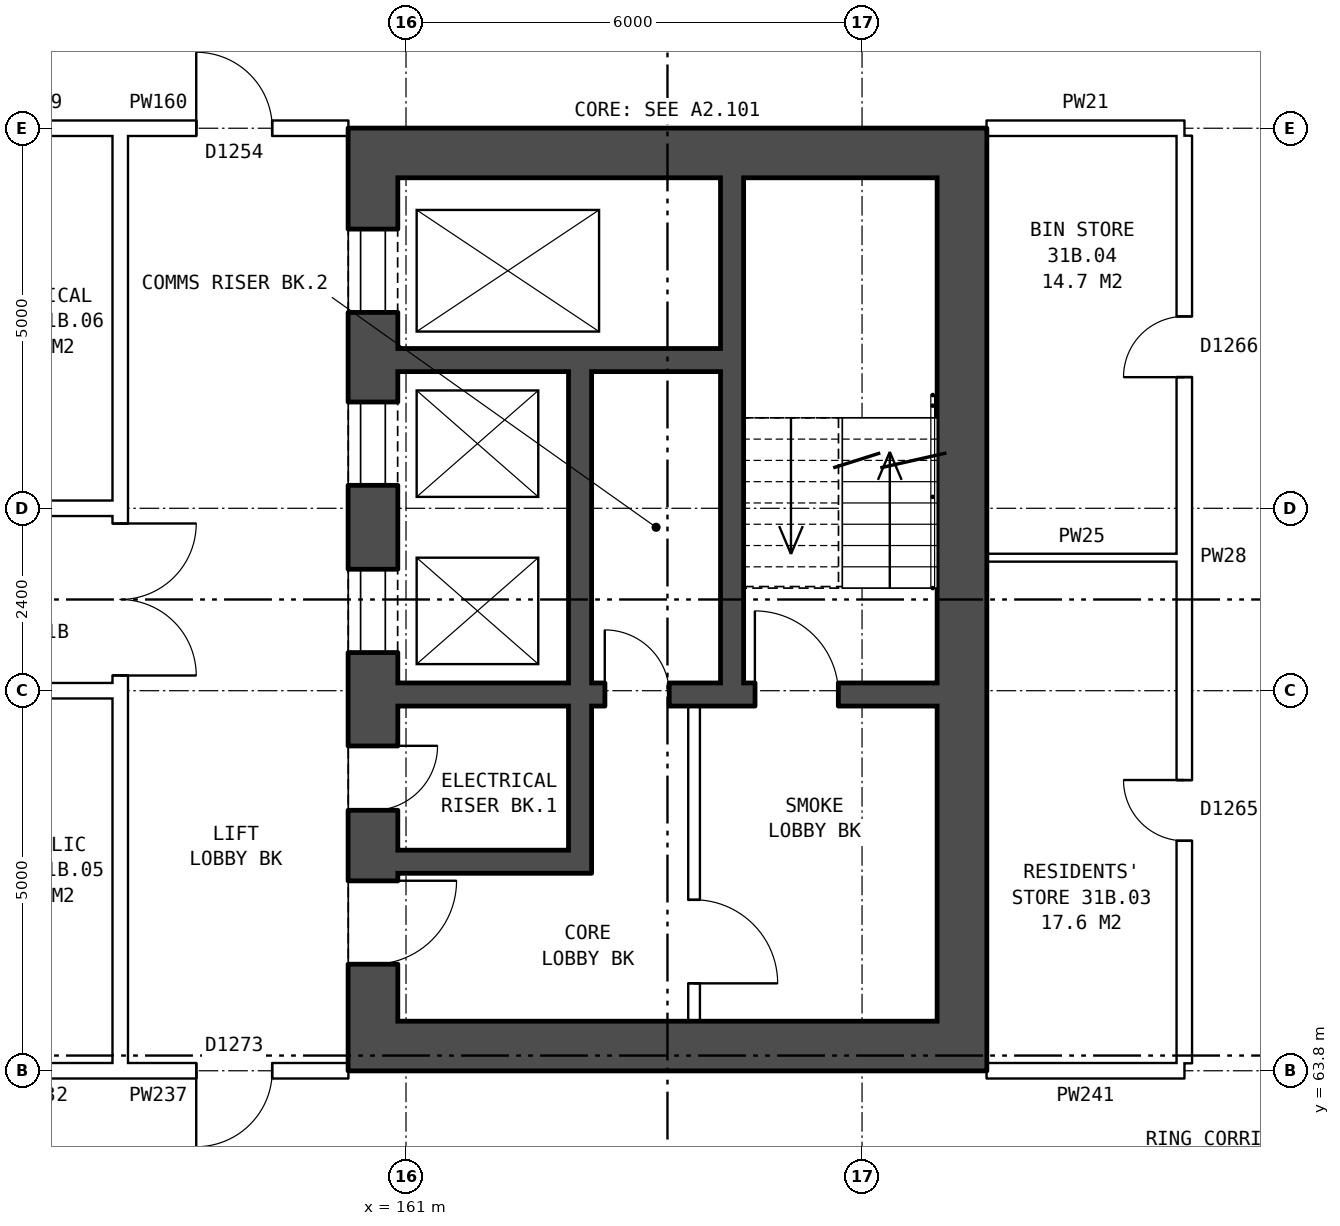
"""IFC4 building model, lengths in metres.
Left out: names, types, materials, properties, quantities, classifications, styles, units other than length and angle.
Written with IfcOpenShell. Run it as: python <this file> out.ifc"""

import sys

from ifc_helpers import new_model, si_unit, direction, frame, frame_2d, origin, place, context, subcontext, project, spatial, rectangle, extrude, element, fill, save


model = new_model("IFC4")
c1 = context("Model", 3, precision=1e-05, world=origin(), true_north=direction((0.0, 1.0)))
c2 = subcontext(c1, "Body", "Model", "MODEL_VIEW")
j1 = project(units=[si_unit("LENGTHUNIT", "METRE"), si_unit("PLANEANGLEUNIT", "RADIAN")], contexts=[c1])
p1 = place(None, origin())
s1 = spatial("IfcSite", under=j1, at=p1, CompositionType="ELEMENT")
p2 = place(p1, origin())
s2 = spatial("IfcBuilding", under=s1, at=p2, CompositionType="ELEMENT")
p3 = place(p2, frame((0.0, 0.0, 111.9)))
s3 = spatial("IfcBuildingStorey", under=s2, at=p3, CompositionType="ELEMENT", Elevation=111.9)
p4 = place(p3, frame((160.565, 75.55, 0.0), z_axis=(0.0, 0.0, 1.0), x_axis=(0.0, -1.0, 0.0)))
e1 = element("IfcWall", 1, at=p4, inside=s3, PredefinedType="SHEAR", context=c2, shape_type="SweptSolid", body=[
    extrude(rectangle(XDim=11.1, YDim=0.65, at=frame_2d((5.55, 0.0))), origin(), (0.0, 0.0, 1.0), 2.85),
])
p5 = place(p4, frame((0.675, 0.0, 0.0)))
e2 = element("IfcOpeningElement", 2, at=p5, cuts=e1, PredefinedType="OPENING", context=c2, shape_type="SweptSolid", body=[
    extrude(rectangle(XDim=1.1, YDim=2.1, at=frame_2d((0.55, 1.05))), frame((0.0, 0.335, 0.0), z_axis=(0.0, -1.0, 0.0), x_axis=(1.0, 0.0, 0.0)), (0.0, 0.0, 1.0), 0.67),
])
p6 = place(p4, frame((2.95, 0.0, 0.0)))
e3 = element("IfcOpeningElement", 3, at=p6, cuts=e1, PredefinedType="OPENING", context=c2, shape_type="SweptSolid", body=[
    extrude(rectangle(XDim=1.1, YDim=2.1, at=frame_2d((0.55, 1.05))), frame((0.0, 0.335, 0.0), z_axis=(0.0, -1.0, 0.0), x_axis=(1.0, 0.0, 0.0)), (0.0, 0.0, 1.0), 0.67),
])
p7 = place(p4, frame((5.15, 0.0, 0.0)))
e4 = element("IfcOpeningElement", 4, at=p7, cuts=e1, PredefinedType="OPENING", context=c2, shape_type="SweptSolid", body=[
    extrude(rectangle(XDim=1.1, YDim=2.1, at=frame_2d((0.55, 1.05))), frame((0.0, 0.335, 0.0), z_axis=(0.0, -1.0, 0.0), x_axis=(1.0, 0.0, 0.0)), (0.0, 0.0, 1.0), 0.67),
])
p8 = place(p4, frame((9.25, 0.0, 0.0)))
e5 = element("IfcOpeningElement", 5, at=p8, cuts=e1, PredefinedType="OPENING", context=c2, shape_type="SweptSolid", body=[
    extrude(rectangle(XDim=1.1, YDim=2.1, at=frame_2d((0.55, 1.05))), frame((0.0, 0.335, 0.0), z_axis=(0.0, -1.0, 0.0), x_axis=(1.0, 0.0, 0.0)), (0.0, 0.0, 1.0), 0.67),
])
p9 = place(p4, frame((7.475, 0.0, 0.0)))
e6 = element("IfcOpeningElement", 6, at=p9, cuts=e1, PredefinedType="OPENING", context=c2, shape_type="SweptSolid", body=[
    extrude(rectangle(XDim=0.85, YDim=2.1, at=frame_2d((0.425, 1.05))), frame((0.0, 0.335, 0.0), z_axis=(0.0, -1.0, 0.0), x_axis=(1.0, 0.0, 0.0)), (0.0, 0.0, 1.0), 0.67),
])
p10 = place(p3, frame((168.315, 75.55, 0.0), z_axis=(0.0, 0.0, 1.0), x_axis=(0.0, -1.0, 0.0)))
e7 = element("IfcWall", 7, at=p10, inside=s3, PredefinedType="SHEAR", context=c2, shape_type="SweptSolid", body=[
    extrude(rectangle(XDim=11.1, YDim=0.65, at=frame_2d((5.55, 0.0))), origin(), (0.0, 0.0, 1.0), 2.85),
])
for number, where, z_axis, x_axis in (
    (8, (160.24, 75.875, 0.0), (0.0, 0.0, 1.0), (1.0, 0.0, 0.0)),
    (9, (160.24, 64.125, 0.0), (0.0, 0.0, 1.0), (1.0, 0.0, 0.0)),
):
    element("IfcWall", number, at=place(p3, frame(where, z_axis=z_axis, x_axis=x_axis)), inside=s3, PredefinedType="SHEAR", context=c2, shape_type="SweptSolid", body=[
        extrude(rectangle(XDim=8.4, YDim=0.65, at=frame_2d((4.2, 0.0))), origin(), (0.0, 0.0, 1.0), 2.85),
    ])
p11 = place(p3, frame((160.89, 73.15, 0.0), z_axis=(0.0, 0.0, 1.0), x_axis=(1.0, 0.0, 0.0)))
e10 = element("IfcWall", 10, at=p11, inside=s3, PredefinedType="SHEAR", context=c2, shape_type="SweptSolid", body=[
    extrude(rectangle(XDim=4.25, YDim=0.3, at=frame_2d((2.125, 0.0))), origin(), (0.0, 0.0, 1.0), 2.85),
])
p12 = place(p3, frame((160.89, 68.75, 0.0), z_axis=(0.0, 0.0, 1.0), x_axis=(1.0, 0.0, 0.0)))
e11 = element("IfcWall", 11, at=p12, inside=s3, PredefinedType="SHEAR", context=c2, shape_type="SweptSolid", body=[
    extrude(rectangle(XDim=7.1, YDim=0.3, at=frame_2d((3.55, 0.0))), origin(), (0.0, 0.0, 1.0), 2.85),
])
p13 = place(p12, frame((4.7, 0.0, 0.0)))
e12 = element("IfcOpeningElement", 12, at=p13, cuts=e11, PredefinedType="OPENING", context=c2, shape_type="SweptSolid", body=[
    extrude(rectangle(XDim=1.1, YDim=2.1, at=frame_2d((0.55, 1.05))), frame((0.0, 0.16, 0.0), z_axis=(0.0, -1.0, 0.0), x_axis=(1.0, 0.0, 0.0)), (0.0, 0.0, 1.0), 0.32),
])
p14 = place(p12, frame((2.725, 0.0, 0.0)))
e13 = element("IfcOpeningElement", 13, at=p14, cuts=e11, PredefinedType="OPENING", context=c2, shape_type="SweptSolid", body=[
    extrude(rectangle(XDim=0.85, YDim=2.1, at=frame_2d((0.425, 1.05))), frame((0.0, 0.16, 0.0), z_axis=(0.0, -1.0, 0.0), x_axis=(1.0, 0.0, 0.0)), (0.0, 0.0, 1.0), 0.32),
])
p15 = place(p3, frame((160.89, 66.55, 0.0), z_axis=(0.0, 0.0, 1.0), x_axis=(1.0, 0.0, 0.0)))
e14 = element("IfcWall", 14, at=p15, inside=s3, PredefinedType="SHEAR", context=c2, shape_type="SweptSolid", body=[
    extrude(rectangle(XDim=2.25, YDim=0.3, at=frame_2d((1.125, 0.0))), origin(), (0.0, 0.0, 1.0), 2.85),
])
p16 = place(p3, frame((163.29, 73.0, 0.0), z_axis=(0.0, 0.0, 1.0), x_axis=(0.0, -1.0, 0.0)))
e15 = element("IfcWall", 15, at=p16, inside=s3, PredefinedType="SHEAR", context=c2, shape_type="SweptSolid", body=[
    extrude(rectangle(XDim=4.1, YDim=0.3, at=frame_2d((2.05, 0.0))), origin(), (0.0, 0.0, 1.0), 2.85),
])
p17 = place(p3, frame((163.29, 68.6, 0.0), z_axis=(0.0, 0.0, 1.0), x_axis=(0.0, -1.0, 0.0)))
e16 = element("IfcWall", 16, at=p17, inside=s3, PredefinedType="SHEAR", context=c2, shape_type="SweptSolid", body=[
    extrude(rectangle(XDim=2.2, YDim=0.3, at=frame_2d((1.1, 0.0))), origin(), (0.0, 0.0, 1.0), 2.85),
])
p18 = place(p3, frame((164.79, 68.6, 0.0), z_axis=(0.0, 0.0, 1.0), x_axis=(0.0, -1.0, 0.0)))
e17 = element("IfcWall", 17, at=p18, inside=s3, PredefinedType="PARTITIONING", context=c2, shape_type="SweptSolid", body=[
    extrude(rectangle(XDim=4.15, YDim=0.15, at=frame_2d((2.075, 0.0))), origin(), (0.0, 0.0, 1.0), 2.85),
])
p19 = place(p18, frame((2.55, 0.0, 0.0)))
e18 = element("IfcOpeningElement", 18, at=p19, cuts=e17, PredefinedType="OPENING", context=c2, shape_type="SweptSolid", body=[
    extrude(rectangle(XDim=1.1, YDim=2.1, at=frame_2d((0.55, 1.05))), frame((0.0, 0.085, 0.0), z_axis=(0.0, -1.0, 0.0), x_axis=(1.0, 0.0, 0.0)), (0.0, 0.0, 1.0), 0.17),
])
p20 = place(p3, frame((165.29, 75.55, 0.0), z_axis=(0.0, 0.0, 1.0), x_axis=(0.0, -1.0, 0.0)))
e19 = element("IfcWall", 19, at=p20, inside=s3, PredefinedType="SHEAR", context=c2, shape_type="SweptSolid", body=[
    extrude(rectangle(XDim=6.65, YDim=0.3, at=frame_2d((3.325, 0.0))), origin(), (0.0, 0.0, 1.0), 2.85),
])
p21 = place(p3, frame((157.24, 63.9, 0.0), z_axis=(0.0, 0.0, 1.0), x_axis=(0.0, 1.0, 0.0)))
e20 = element("IfcWall", 20, at=p21, inside=s3, PredefinedType="PARTITIONING", context=c2, shape_type="SweptSolid", body=[
    extrude(rectangle(XDim=12.2, YDim=0.2, at=frame_2d((6.1, 0.0))), origin(), (0.0, 0.0, 1.0), 2.85),
])
p22 = place(p21, frame((5.1, 0.0, 0.0)))
e21 = element("IfcOpeningElement", 21, at=p22, cuts=e20, PredefinedType="OPENING", context=c2, shape_type="SweptSolid", body=[
    extrude(rectangle(XDim=2.0, YDim=2.1, at=frame_2d((1.0, 1.05))), frame((0.0, 0.11, 0.0), z_axis=(0.0, -1.0, 0.0), x_axis=(1.0, 0.0, 0.0)), (0.0, 0.0, 1.0), 0.22),
])
p23 = place(p3, frame((155.1, 63.8, 0.0), z_axis=(0.0, 0.0, 1.0), x_axis=(1.0, 0.0, 0.0)))
e22 = element("IfcWall", 22, at=p23, inside=s3, PredefinedType="PARTITIONING", context=c2, shape_type="SweptSolid", body=[
    extrude(rectangle(XDim=2.14, YDim=0.2, at=frame_2d((1.07, 0.0))), origin(), (0.0, 0.0, 1.0), 2.85),
])
p24 = place(p3, frame((157.24, 63.8, 0.0), z_axis=(0.0, 0.0, 1.0), x_axis=(1.0, 0.0, 0.0)))
e23 = element("IfcWall", 23, at=p24, inside=s3, PredefinedType="PARTITIONING", context=c2, shape_type="SweptSolid", body=[
    extrude(rectangle(XDim=3.0, YDim=0.2, at=frame_2d((1.5, 0.0))), origin(), (0.0, 0.0, 1.0), 2.85),
])
p25 = place(p24, frame((1.0, 0.0, 0.0)))
e24 = element("IfcOpeningElement", 24, at=p25, cuts=e23, PredefinedType="OPENING", context=c2, shape_type="SweptSolid", body=[
    extrude(rectangle(XDim=1.0, YDim=2.1, at=frame_2d((0.5, 1.05))), frame((0.0, 0.11, 0.0), z_axis=(0.0, -1.0, 0.0), x_axis=(1.0, 0.0, 0.0)), (0.0, 0.0, 1.0), 0.22),
])
p26 = place(p3, frame((168.64, 63.8, 0.0), z_axis=(0.0, 0.0, 1.0), x_axis=(1.0, 0.0, 0.0)))
e25 = element("IfcWall", 25, at=p26, inside=s3, PredefinedType="PARTITIONING", context=c2, shape_type="SweptSolid", body=[
    extrude(rectangle(XDim=2.6, YDim=0.2, at=frame_2d((1.3, 0.0))), origin(), (0.0, 0.0, 1.0), 2.85),
])
p27 = place(p3, frame((142.76, 68.8, 0.0), z_axis=(0.0, 0.0, 1.0), x_axis=(1.0, 0.0, 0.0)))
e26 = element("IfcWall", 26, at=p27, inside=s3, PredefinedType="PARTITIONING", context=c2, shape_type="SweptSolid", body=[
    extrude(rectangle(XDim=14.48, YDim=0.2, at=frame_2d((7.24, 0.0))), origin(), (0.0, 0.0, 1.0), 2.85),
])
p28 = place(p27, frame((4.24, 0.0, 0.0)))
e27 = element("IfcOpeningElement", 27, at=p28, cuts=e26, PredefinedType="OPENING", context=c2, shape_type="SweptSolid", body=[
    extrude(rectangle(XDim=1.0, YDim=2.1, at=frame_2d((0.5, 1.05))), frame((0.0, 0.11, 0.0), z_axis=(0.0, -1.0, 0.0), x_axis=(1.0, 0.0, 0.0)), (0.0, 0.0, 1.0), 0.22),
])
p29 = place(p27, frame((10.24, 0.0, 0.0)))
e28 = element("IfcOpeningElement", 28, at=p29, cuts=e26, PredefinedType="OPENING", context=c2, shape_type="SweptSolid", body=[
    extrude(rectangle(XDim=1.0, YDim=2.1, at=frame_2d((0.5, 1.05))), frame((0.0, 0.11, 0.0), z_axis=(0.0, -1.0, 0.0), x_axis=(1.0, 0.0, 0.0)), (0.0, 0.0, 1.0), 0.22),
])
p30 = place(p3, frame((168.64, 70.55, 0.0), z_axis=(0.0, 0.0, 1.0), x_axis=(1.0, 0.0, 0.0)))
e29 = element("IfcWall", 29, at=p30, inside=s3, PredefinedType="PARTITIONING", context=c2, shape_type="SweptSolid", body=[
    extrude(rectangle(XDim=2.5, YDim=0.1, at=frame_2d((1.25, 0.0))), origin(), (0.0, 0.0, 1.0), 2.85),
])
p31 = place(p3, frame((142.76, 71.2, 0.0), z_axis=(0.0, 0.0, 1.0), x_axis=(1.0, 0.0, 0.0)))
e30 = element("IfcWall", 30, at=p31, inside=s3, PredefinedType="PARTITIONING", context=c2, shape_type="SweptSolid", body=[
    extrude(rectangle(XDim=14.48, YDim=0.2, at=frame_2d((7.24, 0.0))), origin(), (0.0, 0.0, 1.0), 2.85),
])
p32 = place(p31, frame((4.24, 0.0, 0.0)))
e31 = element("IfcOpeningElement", 31, at=p32, cuts=e30, PredefinedType="OPENING", context=c2, shape_type="SweptSolid", body=[
    extrude(rectangle(XDim=1.0, YDim=2.1, at=frame_2d((0.5, 1.05))), frame((0.0, 0.11, 0.0), z_axis=(0.0, -1.0, 0.0), x_axis=(1.0, 0.0, 0.0)), (0.0, 0.0, 1.0), 0.22),
])
p33 = place(p31, frame((10.24, 0.0, 0.0)))
e32 = element("IfcOpeningElement", 32, at=p33, cuts=e30, PredefinedType="OPENING", context=c2, shape_type="SweptSolid", body=[
    extrude(rectangle(XDim=1.0, YDim=2.1, at=frame_2d((0.5, 1.05))), frame((0.0, 0.11, 0.0), z_axis=(0.0, -1.0, 0.0), x_axis=(1.0, 0.0, 0.0)), (0.0, 0.0, 1.0), 0.22),
])
p34 = place(p3, frame((155.1, 76.2, 0.0), z_axis=(0.0, 0.0, 1.0), x_axis=(1.0, 0.0, 0.0)))
e33 = element("IfcWall", 33, at=p34, inside=s3, PredefinedType="PARTITIONING", context=c2, shape_type="SweptSolid", body=[
    extrude(rectangle(XDim=2.14, YDim=0.2, at=frame_2d((1.07, 0.0))), origin(), (0.0, 0.0, 1.0), 2.85),
])
p35 = place(p3, frame((157.24, 76.2, 0.0), z_axis=(0.0, 0.0, 1.0), x_axis=(1.0, 0.0, 0.0)))
e34 = element("IfcWall", 34, at=p35, inside=s3, PredefinedType="PARTITIONING", context=c2, shape_type="SweptSolid", body=[
    extrude(rectangle(XDim=3.0, YDim=0.2, at=frame_2d((1.5, 0.0))), origin(), (0.0, 0.0, 1.0), 2.85),
])
p36 = place(p35, frame((1.0, 0.0, 0.0)))
e35 = element("IfcOpeningElement", 35, at=p36, cuts=e34, PredefinedType="OPENING", context=c2, shape_type="SweptSolid", body=[
    extrude(rectangle(XDim=1.0, YDim=2.1, at=frame_2d((0.5, 1.05))), frame((0.0, 0.11, 0.0), z_axis=(0.0, -1.0, 0.0), x_axis=(1.0, 0.0, 0.0)), (0.0, 0.0, 1.0), 0.22),
])
p37 = place(p3, frame((168.64, 76.2, 0.0), z_axis=(0.0, 0.0, 1.0), x_axis=(1.0, 0.0, 0.0)))
e36 = element("IfcWall", 36, at=p37, inside=s3, PredefinedType="PARTITIONING", context=c2, shape_type="SweptSolid", body=[
    extrude(rectangle(XDim=2.6, YDim=0.2, at=frame_2d((1.3, 0.0))), origin(), (0.0, 0.0, 1.0), 2.85),
])
p38 = place(p3, frame((171.24, 63.9, 0.0), z_axis=(0.0, 0.0, 1.0), x_axis=(0.0, 1.0, 0.0)))
e37 = element("IfcWall", 37, at=p38, inside=s3, PredefinedType="PARTITIONING", context=c2, shape_type="SweptSolid", body=[
    extrude(rectangle(XDim=12.2, YDim=0.2, at=frame_2d((6.1, 0.0))), origin(), (0.0, 0.0, 1.0), 2.85),
])
p39 = place(p38, frame((2.925, 0.0, 0.0)))
e38 = element("IfcOpeningElement", 38, at=p39, cuts=e37, PredefinedType="OPENING", context=c2, shape_type="SweptSolid", body=[
    extrude(rectangle(XDim=0.8, YDim=2.1, at=frame_2d((0.4, 1.05))), frame((0.0, 0.11, 0.0), z_axis=(0.0, -1.0, 0.0), x_axis=(1.0, 0.0, 0.0)), (0.0, 0.0, 1.0), 0.22),
])
p40 = place(p38, frame((9.025, 0.0, 0.0)))
e39 = element("IfcOpeningElement", 39, at=p40, cuts=e37, PredefinedType="OPENING", context=c2, shape_type="SweptSolid", body=[
    extrude(rectangle(XDim=0.8, YDim=2.1, at=frame_2d((0.4, 1.05))), frame((0.0, 0.11, 0.0), z_axis=(0.0, -1.0, 0.0), x_axis=(1.0, 0.0, 0.0)), (0.0, 0.0, 1.0), 0.22),
])
p41 = place(p5, origin())
e40 = element("IfcDoor", 40, at=p41, inside=s3, OperationType="DOUBLE_DOOR_SLIDING", PredefinedType="DOOR", context=c2, shape_type="SweptSolid", body=[
    extrude(rectangle(XDim=1.1, YDim=2.1, at=frame_2d((0.55, 1.05))), frame((0.0, 0.31, 0.0), z_axis=(0.0, -1.0, 0.0), x_axis=(1.0, 0.0, 0.0)), (0.0, 0.0, 1.0), 0.05),
])
fill(e2, e40)
p42 = place(p6, origin())
e41 = element("IfcDoor", 41, at=p42, inside=s3, OperationType="DOUBLE_DOOR_SLIDING", PredefinedType="DOOR", context=c2, shape_type="SweptSolid", body=[
    extrude(rectangle(XDim=1.1, YDim=2.1, at=frame_2d((0.55, 1.05))), frame((0.0, 0.31, 0.0), z_axis=(0.0, -1.0, 0.0), x_axis=(1.0, 0.0, 0.0)), (0.0, 0.0, 1.0), 0.05),
])
fill(e3, e41)
p43 = place(p7, origin())
e42 = element("IfcDoor", 42, at=p43, inside=s3, OperationType="DOUBLE_DOOR_SLIDING", PredefinedType="DOOR", context=c2, shape_type="SweptSolid", body=[
    extrude(rectangle(XDim=1.1, YDim=2.1, at=frame_2d((0.55, 1.05))), frame((0.0, 0.31, 0.0), z_axis=(0.0, -1.0, 0.0), x_axis=(1.0, 0.0, 0.0)), (0.0, 0.0, 1.0), 0.05),
])
fill(e4, e42)
p44 = place(p8, origin())
e43 = element("IfcDoor", 43, at=p44, inside=s3, OperationType="SINGLE_SWING_LEFT", PredefinedType="DOOR", context=c2, shape_type="SweptSolid", body=[
    extrude(rectangle(XDim=1.1, YDim=2.1, at=frame_2d((0.55, 1.05))), frame((0.0, 0.31, 0.0), z_axis=(0.0, -1.0, 0.0), x_axis=(1.0, 0.0, 0.0)), (0.0, 0.0, 1.0), 0.05),
])
fill(e5, e43)
p45 = place(p19, origin())
e44 = element("IfcDoor", 44, at=p45, inside=s3, OperationType="SINGLE_SWING_RIGHT", PredefinedType="DOOR", context=c2, shape_type="SweptSolid", body=[
    extrude(rectangle(XDim=1.1, YDim=2.1, at=frame_2d((0.55, 1.05))), frame((0.0, 0.025, 0.0), z_axis=(0.0, -1.0, 0.0), x_axis=(1.0, 0.0, 0.0)), (0.0, 0.0, 1.0), 0.05),
])
fill(e18, e44)
p46 = place(p13, origin())
e45 = element("IfcDoor", 45, at=p46, inside=s3, OperationType="SINGLE_SWING_LEFT", PredefinedType="DOOR", context=c2, shape_type="SweptSolid", body=[
    extrude(rectangle(XDim=1.1, YDim=2.1, at=frame_2d((0.55, 1.05))), frame((0.0, 0.025, 0.0), z_axis=(0.0, -1.0, 0.0), x_axis=(1.0, 0.0, 0.0)), (0.0, 0.0, 1.0), 0.05),
])
fill(e12, e45)
p47 = place(p9, origin())
e46 = element("IfcDoor", 46, at=p47, inside=s3, OperationType="SINGLE_SWING_LEFT", PredefinedType="DOOR", context=c2, shape_type="SweptSolid", body=[
    extrude(rectangle(XDim=0.85, YDim=2.1, at=frame_2d((0.425, 1.05))), frame((0.0, 0.31, 0.0), z_axis=(0.0, -1.0, 0.0), x_axis=(1.0, 0.0, 0.0)), (0.0, 0.0, 1.0), 0.05),
])
fill(e6, e46)
p48 = place(p14, origin())
e47 = element("IfcDoor", 47, at=p48, inside=s3, OperationType="SINGLE_SWING_LEFT", PredefinedType="DOOR", context=c2, shape_type="SweptSolid", body=[
    extrude(rectangle(XDim=0.85, YDim=2.1, at=frame_2d((0.425, 1.05))), frame((0.0, 0.025, 0.0), z_axis=(0.0, -1.0, 0.0), x_axis=(1.0, 0.0, 0.0)), (0.0, 0.0, 1.0), 0.05),
])
fill(e13, e47)
p49 = place(p22, frame((2.0, 0.0, 0.0), z_axis=(0.0, 0.0, 1.0), x_axis=(-1.0, 0.0, 0.0)))
e48 = element("IfcDoor", 48, at=p49, inside=s3, OperationType="DOUBLE_DOOR_SINGLE_SWING", PredefinedType="DOOR", context=c2, shape_type="SweptSolid", body=[
    extrude(rectangle(XDim=2.0, YDim=2.1, at=frame_2d((1.0, 1.05))), frame((0.0, 0.025, 0.0), z_axis=(0.0, -1.0, 0.0), x_axis=(1.0, 0.0, 0.0)), (0.0, 0.0, 1.0), 0.05),
])
fill(e21, e48)
p50 = place(p25, frame((1.0, 0.0, 0.0), z_axis=(0.0, 0.0, 1.0), x_axis=(-1.0, 0.0, 0.0)))
e49 = element("IfcDoor", 49, at=p50, inside=s3, OperationType="SINGLE_SWING_RIGHT", PredefinedType="DOOR", context=c2, shape_type="SweptSolid", body=[
    extrude(rectangle(XDim=1.0, YDim=2.1, at=frame_2d((0.5, 1.05))), frame((0.0, 0.025, 0.0), z_axis=(0.0, -1.0, 0.0), x_axis=(1.0, 0.0, 0.0)), (0.0, 0.0, 1.0), 0.05),
])
fill(e24, e49)
p51 = place(p36, origin())
e50 = element("IfcDoor", 50, at=p51, inside=s3, OperationType="SINGLE_SWING_LEFT", PredefinedType="DOOR", context=c2, shape_type="SweptSolid", body=[
    extrude(rectangle(XDim=1.0, YDim=2.1, at=frame_2d((0.5, 1.05))), frame((0.0, 0.025, 0.0), z_axis=(0.0, -1.0, 0.0), x_axis=(1.0, 0.0, 0.0)), (0.0, 0.0, 1.0), 0.05),
])
fill(e35, e50)
p52 = place(p39, origin())
e51 = element("IfcDoor", 51, at=p52, inside=s3, OperationType="SINGLE_SWING_RIGHT", PredefinedType="DOOR", context=c2, shape_type="SweptSolid", body=[
    extrude(rectangle(XDim=0.8, YDim=2.1, at=frame_2d((0.4, 1.05))), frame((0.0, 0.025, 0.0), z_axis=(0.0, -1.0, 0.0), x_axis=(1.0, 0.0, 0.0)), (0.0, 0.0, 1.0), 0.05),
])
fill(e38, e51)
p53 = place(p40, origin())
e52 = element("IfcDoor", 52, at=p53, inside=s3, OperationType="SINGLE_SWING_LEFT", PredefinedType="DOOR", context=c2, shape_type="SweptSolid", body=[
    extrude(rectangle(XDim=0.8, YDim=2.1, at=frame_2d((0.4, 1.05))), frame((0.0, 0.025, 0.0), z_axis=(0.0, -1.0, 0.0), x_axis=(1.0, 0.0, 0.0)), (0.0, 0.0, 1.0), 0.05),
])
fill(e39, e52)
save(model, sys.argv[1])
